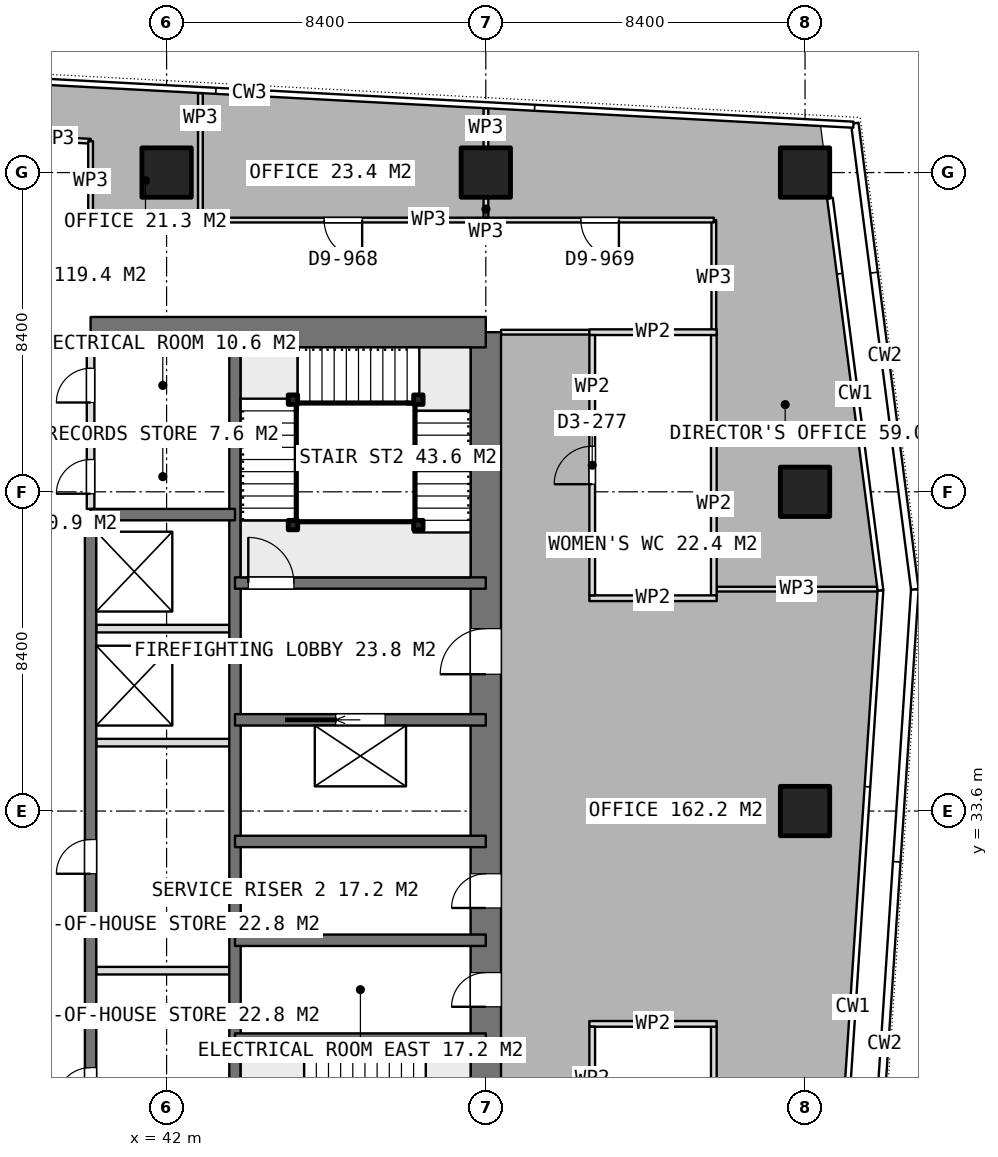
"""IFC4 building model, lengths in metres.
Left out: names, types, materials, properties, quantities, classifications, styles, units other than length and angle.
Written with IfcOpenShell. Run it as: python <this file> out.ifc"""

import sys

from ifc_helpers import new_model, si_unit, direction, frame, frame_2d, origin, origin_2d, place, context, subcontext, project, spatial, rectangle, extrude, element, fill, save


model = new_model("IFC4")
c1 = context("Model", 3, precision=1e-05, world=origin(), true_north=direction((0.0, 1.0)))
c2 = subcontext(c1, "Body", "Model", "MODEL_VIEW")
j1 = project(units=[si_unit("LENGTHUNIT", "METRE"), si_unit("PLANEANGLEUNIT", "RADIAN")], contexts=[c1])
p1 = place(None, origin())
s1 = spatial("IfcSite", under=j1, at=p1, CompositionType="ELEMENT")
p2 = place(p1, origin())
s2 = spatial("IfcBuilding", under=s1, at=p2, CompositionType="ELEMENT")
p3 = place(p2, frame((0.0, 0.0, 257.6)))
s3 = spatial("IfcBuildingStorey", under=s2, at=p3, CompositionType="ELEMENT", Elevation=257.6)
p4 = place(p3, frame((40.0, 46.2, 0.0), z_axis=(0.0, 0.0, 1.0), x_axis=(1.0, 0.0, 0.0)))
e1 = element("IfcWall", 1, at=p4, inside=s3, PredefinedType="SHEAR", context=c2, shape_type="SweptSolid", body=[
    extrude(rectangle(XDim=10.4, YDim=0.8, at=frame_2d((5.2, 0.0))), origin(), (0.0, 0.0, 1.0), 3.75),
])
p5 = place(p3, frame((50.4, 21.0, 0.0), z_axis=(0.0, 0.0, 1.0), x_axis=(0.0, 1.0, 0.0)))
e2 = element("IfcWall", 2, at=p5, inside=s3, PredefinedType="SHEAR", context=c2, shape_type="SweptSolid", body=[
    extrude(rectangle(XDim=25.2, YDim=0.8, at=frame_2d((12.6, 0.0))), origin(), (0.0, 0.0, 1.0), 3.75),
])
p6 = place(p5, frame((16.2, 0.0, 0.0)))
e3 = element("IfcOpeningElement", 3, at=p6, cuts=e2, PredefinedType="OPENING", context=c2, shape_type="SweptSolid", body=[
    extrude(rectangle(XDim=1.2, YDim=2.1, at=frame_2d((0.6, 1.05))), frame((0.0, 0.41, 0.0), z_axis=(0.0, -1.0, 0.0), x_axis=(1.0, 0.0, 0.0)), (0.0, 0.0, 1.0), 0.82),
])
p7 = place(p5, frame((10.05, 0.0, 0.0)))
e4 = element("IfcOpeningElement", 4, at=p7, cuts=e2, PredefinedType="OPENING", context=c2, shape_type="SweptSolid", body=[
    extrude(rectangle(XDim=0.9, YDim=2.1, at=frame_2d((0.45, 1.05))), frame((0.0, 0.41, 0.0), z_axis=(0.0, -1.0, 0.0), x_axis=(1.0, 0.0, 0.0)), (0.0, 0.0, 1.0), 0.82),
])
p8 = place(p5, frame((7.45, 0.0, 0.0)))
e5 = element("IfcOpeningElement", 5, at=p8, cuts=e2, PredefinedType="OPENING", context=c2, shape_type="SweptSolid", body=[
    extrude(rectangle(XDim=0.9, YDim=2.1, at=frame_2d((0.45, 1.05))), frame((0.0, 0.41, 0.0), z_axis=(0.0, -1.0, 0.0), x_axis=(1.0, 0.0, 0.0)), (0.0, 0.0, 1.0), 0.82),
])
p9 = place(p5, frame((0.6, 0.0, 0.0)))
e6 = element("IfcOpeningElement", 6, at=p9, cuts=e2, PredefinedType="OPENING", context=c2, shape_type="SweptSolid", body=[
    extrude(rectangle(XDim=1.2, YDim=2.1, at=frame_2d((0.6, 1.05))), frame((0.0, 0.41, 0.0), z_axis=(0.0, -1.0, 0.0), x_axis=(1.0, 0.0, 0.0)), (0.0, 0.0, 1.0), 0.82),
])
p10 = place(p3, frame((43.8, 21.0, 0.0), z_axis=(0.0, 0.0, 1.0), x_axis=(0.0, 1.0, 0.0)))
e7 = element("IfcWall", 7, at=p10, inside=s3, PredefinedType="SHEAR", context=c2, shape_type="SweptSolid", body=[
    extrude(rectangle(XDim=25.2, YDim=0.3, at=frame_2d((12.6, 0.0))), origin(), (0.0, 0.0, 1.0), 3.75),
])
p11 = place(p3, frame((40.0, 23.4, 0.0), z_axis=(0.0, 0.0, 1.0), x_axis=(0.0, 1.0, 0.0)))
e8 = element("IfcWall", 8, at=p11, inside=s3, PredefinedType="SHEAR", context=c2, shape_type="SweptSolid", body=[
    extrude(rectangle(XDim=18.0, YDim=0.3, at=frame_2d((9.0, 0.0))), origin(), (0.0, 0.0, 1.0), 3.75),
])
p12 = place(p11, frame((2.55, 0.0, 0.0)))
e9 = element("IfcOpeningElement", 9, at=p12, cuts=e8, PredefinedType="OPENING", context=c2, shape_type="SweptSolid", body=[
    extrude(rectangle(XDim=0.9, YDim=2.1, at=frame_2d((0.45, 1.05))), frame((0.0, 0.16, 0.0), z_axis=(0.0, -1.0, 0.0), x_axis=(1.0, 0.0, 0.0)), (0.0, 0.0, 1.0), 0.32),
])
p13 = place(p11, frame((8.55, 0.0, 0.0)))
e10 = element("IfcOpeningElement", 10, at=p13, cuts=e8, PredefinedType="OPENING", context=c2, shape_type="SweptSolid", body=[
    extrude(rectangle(XDim=0.9, YDim=2.1, at=frame_2d((0.45, 1.05))), frame((0.0, 0.16, 0.0), z_axis=(0.0, -1.0, 0.0), x_axis=(1.0, 0.0, 0.0)), (0.0, 0.0, 1.0), 0.32),
])
p14 = place(p3, frame((40.0, 41.4, 0.0), z_axis=(0.0, 0.0, 1.0), x_axis=(1.0, 0.0, 0.0)))
e11 = element("IfcWall", 11, at=p14, inside=s3, PredefinedType="SHEAR", context=c2, shape_type="SweptSolid", body=[
    extrude(rectangle(XDim=3.8, YDim=0.3, at=frame_2d((1.9, 0.0))), origin(), (0.0, 0.0, 1.0), 3.75),
])
for number, where, z_axis, x_axis in (
    (12, (43.8, 27.6, 0.0), (0.0, 0.0, 1.0), (1.0, 0.0, 0.0)),
    (13, (43.8, 30.2, 0.0), (0.0, 0.0, 1.0), (1.0, 0.0, 0.0)),
    (14, (43.8, 32.8, 0.0), (0.0, 0.0, 1.0), (1.0, 0.0, 0.0)),
):
    element("IfcWall", number, at=place(p3, frame(where, z_axis=z_axis, x_axis=x_axis)), inside=s3, PredefinedType="SHEAR", context=c2, shape_type="SweptSolid", body=[
        extrude(rectangle(XDim=6.6, YDim=0.3, at=frame_2d((3.3, 0.0))), origin(), (0.0, 0.0, 1.0), 3.75),
    ])
p15 = place(p3, frame((43.8, 36.0, 0.0), z_axis=(0.0, 0.0, 1.0), x_axis=(1.0, 0.0, 0.0)))
e15 = element("IfcWall", 15, at=p15, inside=s3, PredefinedType="SHEAR", context=c2, shape_type="SweptSolid", body=[
    extrude(rectangle(XDim=6.6, YDim=0.3, at=frame_2d((3.3, 0.0))), origin(), (0.0, 0.0, 1.0), 3.75),
])
p16 = place(p15, frame((2.65, 0.0, 0.0)))
e16 = element("IfcOpeningElement", 16, at=p16, cuts=e15, PredefinedType="OPENING", context=c2, shape_type="SweptSolid", body=[
    extrude(rectangle(XDim=1.3, YDim=2.1, at=frame_2d((0.65, 1.05))), frame((0.0, 0.16, 0.0), z_axis=(0.0, -1.0, 0.0), x_axis=(1.0, 0.0, 0.0)), (0.0, 0.0, 1.0), 0.32),
])
p17 = place(p3, frame((43.8, 39.6, 0.0), z_axis=(0.0, 0.0, 1.0), x_axis=(1.0, 0.0, 0.0)))
e17 = element("IfcWall", 17, at=p17, inside=s3, PredefinedType="SHEAR", context=c2, shape_type="SweptSolid", body=[
    extrude(rectangle(XDim=6.6, YDim=0.3, at=frame_2d((3.3, 0.0))), origin(), (0.0, 0.0, 1.0), 3.75),
])
p18 = place(p17, frame((0.35, 0.0, 0.0)))
e18 = element("IfcOpeningElement", 18, at=p18, cuts=e17, PredefinedType="OPENING", context=c2, shape_type="SweptSolid", body=[
    extrude(rectangle(XDim=1.2, YDim=2.1, at=frame_2d((0.6, 1.05))), frame((0.0, 0.16, 0.0), z_axis=(0.0, -1.0, 0.0), x_axis=(1.0, 0.0, 0.0)), (0.0, 0.0, 1.0), 0.32),
])
for number, where, z_axis, x_axis in (
    (19, (42.0, 50.4, 0.0), (0.0, 0.0, 1.0), (1.0, 0.0, 0.0)),
    (20, (50.4, 50.4, 0.0), (0.0, 0.0, 1.0), (1.0, 0.0, 0.0)),
    (21, (58.8, 33.6, 0.0), (0.0, 0.0, 1.0), (1.0, 0.0, 0.0)),
    (22, (58.8, 42.0, 0.0), (0.0, 0.0, 1.0), (1.0, 0.0, 0.0)),
    (23, (58.8, 50.4, 0.0), (0.0, 0.0, 1.0), (1.0, 0.0, 0.0)),
):
    element("IfcColumn", number, at=place(p3, frame(where, z_axis=z_axis, x_axis=x_axis)), inside=s3, PredefinedType="COLUMN", context=c2, shape_type="SweptSolid", body=[
        extrude(rectangle(XDim=1.3, YDim=1.3, at=origin_2d()), origin(), (0.0, 0.0, 1.0), 3.75),
    ])
for number, where, z_axis, x_axis in (
    (24, (40.15, 29.4, 0.0), (0.0, 0.0, 1.0), (1.0, 0.0, 0.0)),
    (25, (40.15, 35.4, 0.0), (0.0, 0.0, 1.0), (1.0, 0.0, 0.0)),
    (26, (40.15, 38.4, 0.0), (0.0, 0.0, 1.0), (1.0, 0.0, 0.0)),
):
    element("IfcWall", number, at=place(p3, frame(where, z_axis=z_axis, x_axis=x_axis)), inside=s3, PredefinedType="PARTITIONING", context=c2, shape_type="SweptSolid", body=[
        extrude(rectangle(XDim=3.5, YDim=0.2, at=frame_2d((1.75, 0.0))), origin(), (0.0, 0.0, 1.0), 3.5),
    ])
p19 = place(p3, frame((40.0, 41.55, 0.0), z_axis=(0.0, 0.0, 1.0), x_axis=(0.0, 1.0, 0.0)))
e27 = element("IfcWall", 27, at=p19, inside=s3, PredefinedType="PARTITIONING", context=c2, shape_type="SweptSolid", body=[
    extrude(rectangle(XDim=4.25, YDim=0.2, at=frame_2d((2.125, 0.0))), origin(), (0.0, 0.0, 1.0), 3.5),
])
p20 = place(p19, frame((2.8, 0.0, 0.0)))
e28 = element("IfcOpeningElement", 28, at=p20, cuts=e27, PredefinedType="OPENING", context=c2, shape_type="SweptSolid", body=[
    extrude(rectangle(XDim=0.9, YDim=2.1, at=frame_2d((0.45, 1.05))), frame((0.0, 0.11, 0.0), z_axis=(0.0, -1.0, 0.0), x_axis=(1.0, 0.0, 0.0)), (0.0, 0.0, 1.0), 0.22),
])
p21 = place(p19, frame((0.4, 0.0, 0.0)))
e29 = element("IfcOpeningElement", 29, at=p21, cuts=e27, PredefinedType="OPENING", context=c2, shape_type="SweptSolid", body=[
    extrude(rectangle(XDim=0.9, YDim=2.1, at=frame_2d((0.45, 1.05))), frame((0.0, 0.11, 0.0), z_axis=(0.0, -1.0, 0.0), x_axis=(1.0, 0.0, 0.0)), (0.0, 0.0, 1.0), 0.22),
])
p22 = place(p3, frame((40.0, 43.4, 0.0), z_axis=(0.0, 0.0, 1.0), x_axis=(1.0, 0.0, 0.0)))
e30 = element("IfcWall", 30, at=p22, inside=s3, PredefinedType="PARTITIONING", context=c2, shape_type="SweptSolid", body=[
    extrude(rectangle(XDim=3.65, YDim=0.2, at=frame_2d((1.825, 0.0))), origin(), (0.0, 0.0, 1.0), 3.5),
])
for number, where, z_axis, x_axis in (
    (31, (53.125, 39.2, 0.0), (0.0, 0.0, 1.0), (1.0, 0.0, 0.0)),
    (32, (53.125, 46.2, 0.0), (0.0, 0.0, 1.0), (1.0, 0.0, 0.0)),
):
    element("IfcWall", number, at=place(p3, frame(where, z_axis=z_axis, x_axis=x_axis)), inside=s3, PredefinedType="PARTITIONING", context=c2, shape_type="SweptSolid", body=[
        extrude(rectangle(XDim=3.35, YDim=0.15, at=frame_2d((1.675, 0.0))), origin(), (0.0, 0.0, 1.0), 3.5),
    ])
p23 = place(p3, frame((53.2, 39.275, 0.0), z_axis=(0.0, 0.0, 1.0), x_axis=(0.0, 1.0, 0.0)))
e33 = element("IfcWall", 33, at=p23, inside=s3, PredefinedType="PARTITIONING", context=c2, shape_type="SweptSolid", body=[
    extrude(rectangle(XDim=6.85, YDim=0.15, at=frame_2d((3.425, 0.0))), origin(), (0.0, 0.0, 1.0), 3.5),
])
p24 = place(p23, frame((2.925, 0.0, 0.0)))
e34 = element("IfcOpeningElement", 34, at=p24, cuts=e33, PredefinedType="OPENING", context=c2, shape_type="SweptSolid", body=[
    extrude(rectangle(XDim=1.0, YDim=2.1, at=frame_2d((0.5, 1.05))), frame((0.0, 0.085, 0.0), z_axis=(0.0, -1.0, 0.0), x_axis=(1.0, 0.0, 0.0)), (0.0, 0.0, 1.0), 0.17),
])
p25 = place(p3, frame((56.4, 39.275, 0.0), z_axis=(0.0, 0.0, 1.0), x_axis=(0.0, 1.0, 0.0)))
e35 = element("IfcWall", 35, at=p25, inside=s3, PredefinedType="PARTITIONING", context=c2, shape_type="SweptSolid", body=[
    extrude(rectangle(XDim=6.85, YDim=0.15, at=frame_2d((3.425, 0.0))), origin(), (0.0, 0.0, 1.0), 3.5),
])
p26 = place(p3, frame((53.125, 28.0, 0.0), z_axis=(0.0, 0.0, 1.0), x_axis=(1.0, 0.0, 0.0)))
e36 = element("IfcWall", 36, at=p26, inside=s3, PredefinedType="PARTITIONING", context=c2, shape_type="SweptSolid", body=[
    extrude(rectangle(XDim=3.35, YDim=0.15, at=frame_2d((1.675, 0.0))), origin(), (0.0, 0.0, 1.0), 3.5),
])
p27 = place(p3, frame((53.2, 21.075, 0.0), z_axis=(0.0, 0.0, 1.0), x_axis=(0.0, 1.0, 0.0)))
e37 = element("IfcWall", 37, at=p27, inside=s3, PredefinedType="PARTITIONING", context=c2, shape_type="SweptSolid", body=[
    extrude(rectangle(XDim=6.85, YDim=0.15, at=frame_2d((3.425, 0.0))), origin(), (0.0, 0.0, 1.0), 3.5),
])
p28 = place(p27, frame((2.925, 0.0, 0.0)))
e38 = element("IfcOpeningElement", 38, at=p28, cuts=e37, PredefinedType="OPENING", context=c2, shape_type="SweptSolid", body=[
    extrude(rectangle(XDim=1.0, YDim=2.1, at=frame_2d((0.5, 1.05))), frame((0.0, 0.085, 0.0), z_axis=(0.0, -1.0, 0.0), x_axis=(1.0, 0.0, 0.0)), (0.0, 0.0, 1.0), 0.17),
])
p29 = place(p3, frame((56.4, 21.075, 0.0), z_axis=(0.0, 0.0, 1.0), x_axis=(0.0, 1.0, 0.0)))
e39 = element("IfcWall", 39, at=p29, inside=s3, PredefinedType="PARTITIONING", context=c2, shape_type="SweptSolid", body=[
    extrude(rectangle(XDim=6.85, YDim=0.15, at=frame_2d((3.425, 0.0))), origin(), (0.0, 0.0, 1.0), 3.5),
])
p30 = place(p3, frame((50.8, 46.2, 0.0), z_axis=(0.0, 0.0, 1.0), x_axis=(1.0, 0.0, 0.0)))
e40 = element("IfcWall", 40, at=p30, inside=s3, PredefinedType="PARTITIONING", context=c2, shape_type="SweptSolid", body=[
    extrude(rectangle(XDim=2.324, YDim=0.125, at=frame_2d((1.162, 0.0))), origin(), (0.0, 0.0, 1.0), 3.5),
])
p31 = place(p3, frame((56.475, 39.439, 0.0), z_axis=(0.0, 0.0, 1.0), x_axis=(1.0, 0.0, 0.0)))
e41 = element("IfcWall", 41, at=p31, inside=s3, PredefinedType="PARTITIONING", context=c2, shape_type="SweptSolid", body=[
    extrude(rectangle(XDim=4.225, YDim=0.125, at=frame_2d((2.112, 0.0))), origin(), (0.0, 0.0, 1.0), 3.5),
])
p32 = place(p3, frame((50.403, 49.15, 0.0), z_axis=(0.0, 0.0, 1.0), x_axis=(0.0, 1.0, 0.0)))
e42 = element("IfcWall", 42, at=p32, inside=s3, PredefinedType="PARTITIONING", context=c2, shape_type="SweptSolid", body=[
    extrude(rectangle(XDim=0.58, YDim=0.125, at=frame_2d((0.29, 0.0))), origin(), (0.0, 0.0, 1.0), 3.5),
])
p33 = place(p3, frame((50.403, 51.07, 0.0), z_axis=(0.0, 0.0, 1.0), x_axis=(0.0, 1.0, 0.0)))
e43 = element("IfcWall", 43, at=p33, inside=s3, PredefinedType="PARTITIONING", context=c2, shape_type="SweptSolid", body=[
    extrude(rectangle(XDim=1.024, YDim=0.125, at=frame_2d((0.512, 0.0))), origin(), (0.0, 0.0, 1.0), 3.5),
])
p34 = place(p3, frame((56.4, 46.125, 0.0), z_axis=(0.0, 0.0, 1.0), x_axis=(0.0, 1.0, 0.0)))
e44 = element("IfcWall", 44, at=p34, inside=s3, PredefinedType="PARTITIONING", context=c2, shape_type="SweptSolid", body=[
    extrude(rectangle(XDim=3.025, YDim=0.125, at=frame_2d((1.512, 0.0))), origin(), (0.0, 0.0, 1.0), 3.5),
])
p35 = place(p3, frame((56.4, 49.15, 0.0), z_axis=(0.0, 0.0, 1.0), x_axis=(-1.0, 0.0, 0.0)))
e45 = element("IfcWall", 45, at=p35, inside=s3, PredefinedType="PARTITIONING", context=c2, shape_type="SweptSolid", body=[
    extrude(rectangle(XDim=5.997, YDim=0.125, at=frame_2d((2.999, 0.0))), origin(), (0.0, 0.0, 1.0), 3.5),
])
p36 = place(p35, frame((2.498, 0.0, 0.0)))
e46 = element("IfcOpeningElement", 46, at=p36, cuts=e45, PredefinedType="OPENING", context=c2, shape_type="SweptSolid", body=[
    extrude(rectangle(XDim=1.0, YDim=2.1, at=frame_2d((0.5, 1.05))), frame((0.0, 0.073, 0.0), z_axis=(0.0, -1.0, 0.0), x_axis=(1.0, 0.0, 0.0)), (0.0, 0.0, 1.0), 0.145),
])
p37 = place(p3, frame((50.402, 49.15, 0.0), z_axis=(0.0, 0.0, 1.0), x_axis=(-1.0, 0.0, 0.0)))
e47 = element("IfcWall", 47, at=p37, inside=s3, PredefinedType="PARTITIONING", context=c2, shape_type="SweptSolid", body=[
    extrude(rectangle(XDim=7.512, YDim=0.125, at=frame_2d((3.756, 0.0))), origin(), (0.0, 0.0, 1.0), 3.5),
])
p38 = place(p37, frame((3.256, 0.0, 0.0)))
e48 = element("IfcOpeningElement", 48, at=p38, cuts=e47, PredefinedType="OPENING", context=c2, shape_type="SweptSolid", body=[
    extrude(rectangle(XDim=1.0, YDim=2.1, at=frame_2d((0.5, 1.05))), frame((0.0, 0.073, 0.0), z_axis=(0.0, -1.0, 0.0), x_axis=(1.0, 0.0, 0.0)), (0.0, 0.0, 1.0), 0.145),
])
p39 = place(p3, frame((42.89, 49.15, 0.0), z_axis=(0.0, 0.0, 1.0), x_axis=(0.0, 1.0, 0.0)))
e49 = element("IfcWall", 49, at=p39, inside=s3, PredefinedType="PARTITIONING", context=c2, shape_type="SweptSolid", body=[
    extrude(rectangle(XDim=3.343, YDim=0.125, at=frame_2d((1.671, 0.0))), origin(), (0.0, 0.0, 1.0), 3.5),
])
p40 = place(p3, frame((40.0, 51.225, 0.0), z_axis=(0.0, 0.0, 1.0), x_axis=(-0.998601864588, 0.052861290579, 0.0)))
e50 = element("IfcWall", 50, at=p40, inside=s3, PredefinedType="PARTITIONING", context=c2, shape_type="SweptSolid", body=[
    extrude(rectangle(XDim=4.406, YDim=0.125, at=frame_2d((2.203, 0.0))), origin(), (0.0, 0.0, 1.0), 3.5),
])
p41 = place(p40, frame((1.703, 0.0, 0.0)))
e51 = element("IfcOpeningElement", 51, at=p41, cuts=e50, PredefinedType="OPENING", context=c2, shape_type="SweptSolid", body=[
    extrude(rectangle(XDim=1.0, YDim=2.1, at=frame_2d((0.5, 1.05))), frame((0.0, 0.073, 0.0), z_axis=(0.0, -1.0, 0.0), x_axis=(1.0, 0.0, 0.0)), (0.0, 0.0, 1.0), 0.145),
])
p42 = place(p3, frame((42.889, 49.15, 0.0), z_axis=(0.0, 0.0, 1.0), x_axis=(-1.0, 0.0, 0.0)))
e52 = element("IfcWall", 52, at=p42, inside=s3, PredefinedType="PARTITIONING", context=c2, shape_type="SweptSolid", body=[
    extrude(rectangle(XDim=2.889, YDim=0.125, at=frame_2d((1.444, 0.0))), origin(), (0.0, 0.0, 1.0), 3.5),
])
p43 = place(p3, frame((40.0, 49.15, 0.0), z_axis=(0.0, 0.0, 1.0), x_axis=(0.0, 1.0, 0.0)))
e53 = element("IfcWall", 53, at=p43, inside=s3, PredefinedType="PARTITIONING", context=c2, shape_type="SweptSolid", body=[
    extrude(rectangle(XDim=2.075, YDim=0.125, at=frame_2d((1.038, 0.0))), origin(), (0.0, 0.0, 1.0), 3.5),
])
for number, where, z_axis, x_axis in (
    (54, (45.325, 41.125, 0.0), (0.0, 0.0, 1.0), (1.0, 0.0, 0.0)),
    (55, (45.325, 44.425, 0.0), (0.0, 0.0, 1.0), (1.0, 0.0, 0.0)),
    (56, (48.625, 44.425, 0.0), (0.0, 0.0, 1.0), (1.0, 0.0, 0.0)),
    (57, (48.625, 41.125, 0.0), (0.0, 0.0, 1.0), (1.0, 0.0, 0.0)),
):
    element("IfcColumn", number, at=place(p3, frame(where, z_axis=z_axis, x_axis=x_axis)), inside=s3, PredefinedType="COLUMN", context=c2, shape_type="SweptSolid", body=[
        extrude(rectangle(XDim=0.25, YDim=0.25, at=origin_2d()), origin(), (0.0, 0.0, 1.0), 3.75),
    ])
p44 = place(p6, origin())
e58 = element("IfcDoor", 58, at=p44, inside=s3, OperationType="SINGLE_SWING_LEFT", PredefinedType="DOOR", context=c2, shape_type="SweptSolid", body=[
    extrude(rectangle(XDim=1.2, YDim=2.1, at=frame_2d((0.6, 1.05))), frame((0.0, 0.025, 0.0), z_axis=(0.0, -1.0, 0.0), x_axis=(1.0, 0.0, 0.0)), (0.0, 0.0, 1.0), 0.05),
])
fill(e3, e58)
p45 = place(p7, origin())
e59 = element("IfcDoor", 59, at=p45, inside=s3, OperationType="SINGLE_SWING_LEFT", PredefinedType="DOOR", context=c2, shape_type="SweptSolid", body=[
    extrude(rectangle(XDim=0.9, YDim=2.1, at=frame_2d((0.45, 1.05))), frame((0.0, 0.025, 0.0), z_axis=(0.0, -1.0, 0.0), x_axis=(1.0, 0.0, 0.0)), (0.0, 0.0, 1.0), 0.05),
])
fill(e4, e59)
p46 = place(p8, origin())
e60 = element("IfcDoor", 60, at=p46, inside=s3, OperationType="SINGLE_SWING_LEFT", PredefinedType="DOOR", context=c2, shape_type="SweptSolid", body=[
    extrude(rectangle(XDim=0.9, YDim=2.1, at=frame_2d((0.45, 1.05))), frame((0.0, 0.025, 0.0), z_axis=(0.0, -1.0, 0.0), x_axis=(1.0, 0.0, 0.0)), (0.0, 0.0, 1.0), 0.05),
])
fill(e5, e60)
p47 = place(p20, origin())
e61 = element("IfcDoor", 61, at=p47, inside=s3, OperationType="SINGLE_SWING_LEFT", PredefinedType="DOOR", context=c2, shape_type="SweptSolid", body=[
    extrude(rectangle(XDim=0.9, YDim=2.1, at=frame_2d((0.45, 1.05))), frame((0.0, 0.025, 0.0), z_axis=(0.0, -1.0, 0.0), x_axis=(1.0, 0.0, 0.0)), (0.0, 0.0, 1.0), 0.05),
])
fill(e28, e61)
p48 = place(p21, origin())
e62 = element("IfcDoor", 62, at=p48, inside=s3, OperationType="SINGLE_SWING_LEFT", PredefinedType="DOOR", context=c2, shape_type="SweptSolid", body=[
    extrude(rectangle(XDim=0.9, YDim=2.1, at=frame_2d((0.45, 1.05))), frame((0.0, 0.025, 0.0), z_axis=(0.0, -1.0, 0.0), x_axis=(1.0, 0.0, 0.0)), (0.0, 0.0, 1.0), 0.05),
])
fill(e29, e62)
p49 = place(p12, origin())
e63 = element("IfcDoor", 63, at=p49, inside=s3, OperationType="SINGLE_SWING_LEFT", PredefinedType="DOOR", context=c2, shape_type="SweptSolid", body=[
    extrude(rectangle(XDim=0.9, YDim=2.1, at=frame_2d((0.45, 1.05))), frame((0.0, 0.025, 0.0), z_axis=(0.0, -1.0, 0.0), x_axis=(1.0, 0.0, 0.0)), (0.0, 0.0, 1.0), 0.05),
])
fill(e9, e63)
p50 = place(p13, origin())
e64 = element("IfcDoor", 64, at=p50, inside=s3, OperationType="SINGLE_SWING_LEFT", PredefinedType="DOOR", context=c2, shape_type="SweptSolid", body=[
    extrude(rectangle(XDim=0.9, YDim=2.1, at=frame_2d((0.45, 1.05))), frame((0.0, 0.025, 0.0), z_axis=(0.0, -1.0, 0.0), x_axis=(1.0, 0.0, 0.0)), (0.0, 0.0, 1.0), 0.05),
])
fill(e10, e64)
p51 = place(p16, origin())
e65 = element("IfcDoor", 65, at=p51, inside=s3, OperationType="SLIDING_TO_LEFT", PredefinedType="USERDEFINED", context=c2, shape_type="SweptSolid", body=[
    extrude(rectangle(XDim=1.3, YDim=2.1, at=frame_2d((0.65, 1.05))), frame((0.0, 0.025, 0.0), z_axis=(0.0, -1.0, 0.0), x_axis=(1.0, 0.0, 0.0)), (0.0, 0.0, 1.0), 0.05),
])
fill(e16, e65)
p52 = place(p24, origin())
e66 = element("IfcDoor", 66, at=p52, inside=s3, OperationType="SINGLE_SWING_LEFT", PredefinedType="DOOR", context=c2, shape_type="SweptSolid", body=[
    extrude(rectangle(XDim=1.0, YDim=2.1, at=frame_2d((0.5, 1.05))), frame((0.0, 0.025, 0.0), z_axis=(0.0, -1.0, 0.0), x_axis=(1.0, 0.0, 0.0)), (0.0, 0.0, 1.0), 0.05),
])
fill(e34, e66)
p53 = place(p36, origin())
e67 = element("IfcDoor", 67, at=p53, inside=s3, OperationType="SINGLE_SWING_LEFT", PredefinedType="DOOR", context=c2, shape_type="SweptSolid", body=[
    extrude(rectangle(XDim=1.0, YDim=2.1, at=frame_2d((0.5, 1.05))), frame((0.0, 0.025, 0.0), z_axis=(0.0, -1.0, 0.0), x_axis=(1.0, 0.0, 0.0)), (0.0, 0.0, 1.0), 0.05),
])
fill(e46, e67)
p54 = place(p38, origin())
e68 = element("IfcDoor", 68, at=p54, inside=s3, OperationType="SINGLE_SWING_LEFT", PredefinedType="DOOR", context=c2, shape_type="SweptSolid", body=[
    extrude(rectangle(XDim=1.0, YDim=2.1, at=frame_2d((0.5, 1.05))), frame((0.0, 0.025, 0.0), z_axis=(0.0, -1.0, 0.0), x_axis=(1.0, 0.0, 0.0)), (0.0, 0.0, 1.0), 0.05),
])
fill(e48, e68)
p55 = place(p18, origin())
e69 = element("IfcDoor", 69, at=p55, inside=s3, OperationType="SINGLE_SWING_RIGHT", PredefinedType="DOOR", context=c2, shape_type="SweptSolid", body=[
    extrude(rectangle(XDim=1.2, YDim=2.1, at=frame_2d((0.6, 1.05))), frame((0.0, 0.025, 0.0), z_axis=(0.0, -1.0, 0.0), x_axis=(1.0, 0.0, 0.0)), (0.0, 0.0, 1.0), 0.05),
])
fill(e18, e69)
save(model, sys.argv[1])
